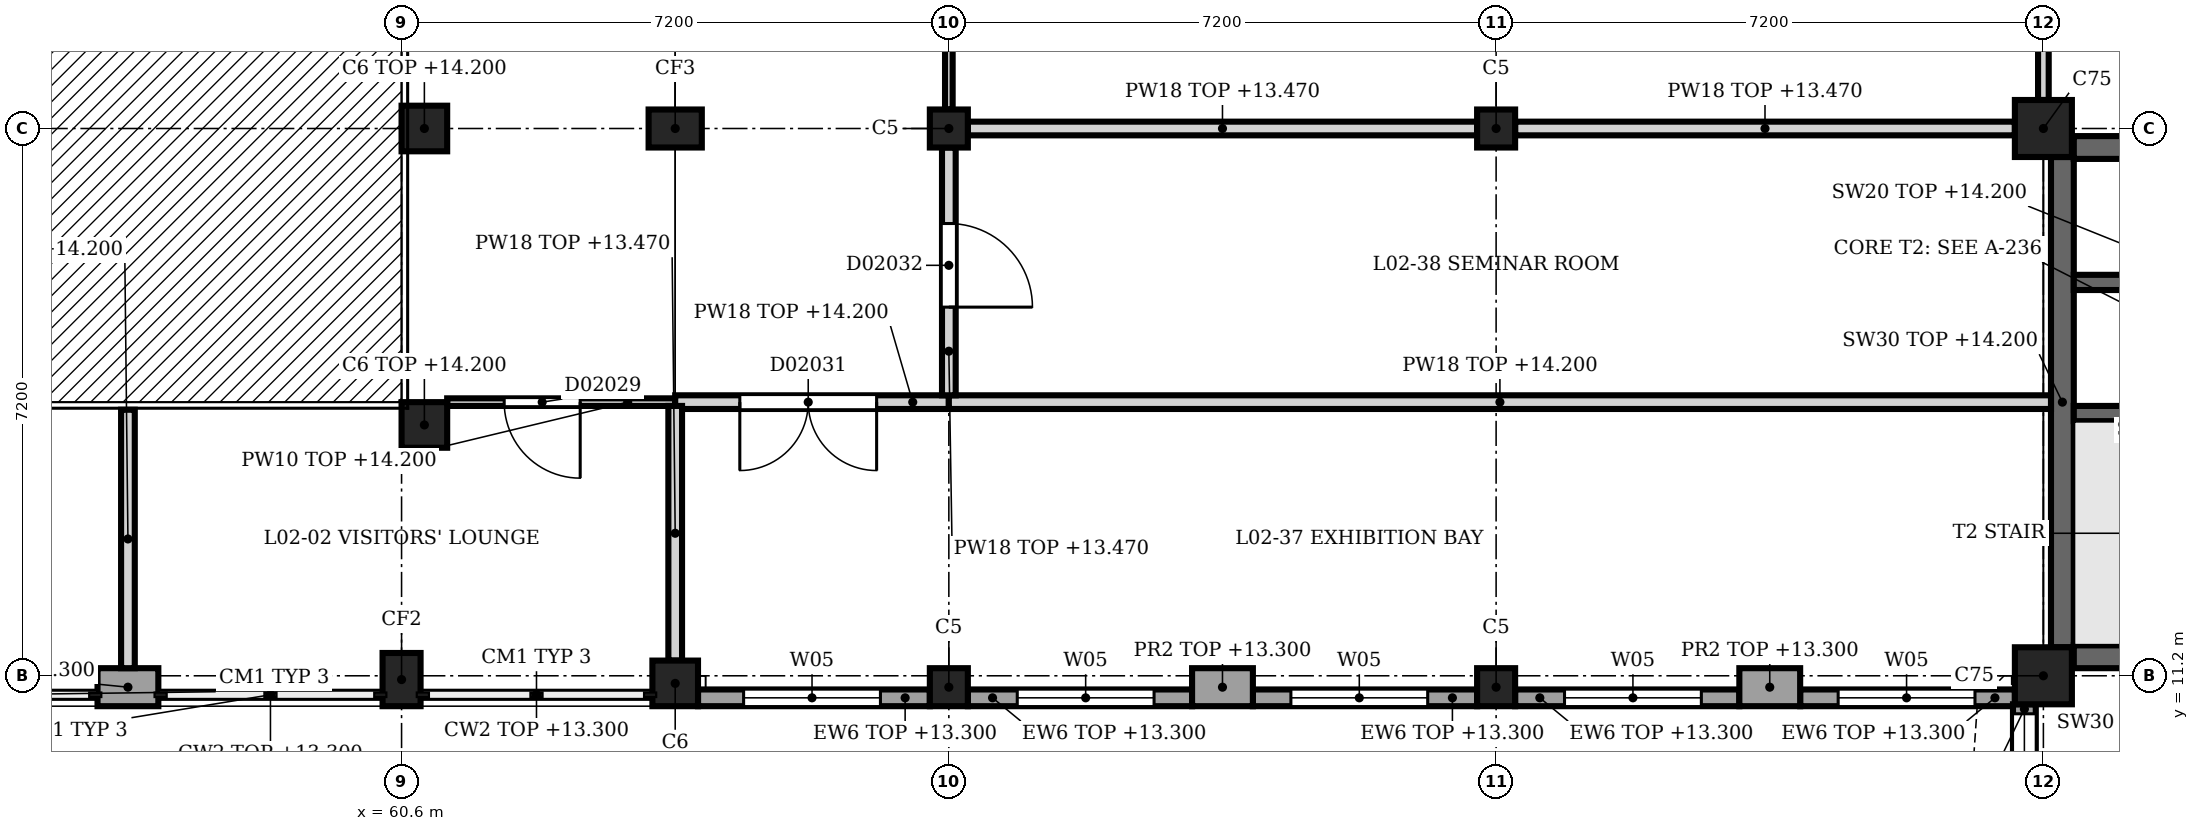
"""IFC4 building model, lengths in metres.
Left out: names, types, materials, properties, quantities, classifications, styles, units other than length and angle.
Written with IfcOpenShell. Run it as: python <this file> out.ifc"""

import sys

from ifc_helpers import new_model, si_unit, direction, frame, frame_2d, origin, origin_2d, place, context, subcontext, project, spatial, rectangle, extrude, element, fill, save


model = new_model("IFC4")
c1 = context("Model", 3, precision=1e-05, world=origin(), true_north=direction((0.0, 1.0)))
c2 = subcontext(c1, "Body", "Model", "MODEL_VIEW")
j1 = project(units=[si_unit("LENGTHUNIT", "METRE"), si_unit("PLANEANGLEUNIT", "RADIAN")], contexts=[c1])
p1 = place(None, origin())
s1 = spatial("IfcSite", under=j1, at=p1, CompositionType="ELEMENT")
p2 = place(p1, origin())
s2 = spatial("IfcBuilding", under=s1, at=p2, CompositionType="ELEMENT")
p3 = place(p2, frame((0.0, 0.0, 9.9)))
s3 = spatial("IfcBuildingStorey", under=s2, at=p3, CompositionType="ELEMENT", Elevation=9.9)
for number, where, z_axis, x_axis in (
    (1, (82.2, 11.2, 0.0), (0.0, 0.0, 1.0), (1.0, 0.0, 0.0)),
    (2, (82.2, 18.4, 0.0), (0.0, 0.0, 1.0), (1.0, 0.0, 0.0)),
):
    element("IfcColumn", number, at=place(p3, frame(where, z_axis=z_axis, x_axis=x_axis)), inside=s3, PredefinedType="COLUMN", context=c2, shape_type="SweptSolid", body=[
        extrude(rectangle(XDim=0.75, YDim=0.75, at=origin_2d()), origin(), (0.0, 0.0, 1.0), 4.5),
    ])
p4 = place(p3, frame((60.6, 11.15, 0.0), z_axis=(0.0, 0.0, 1.0), x_axis=(1.0, 0.0, 0.0)))
e3 = element("IfcColumn", 3, at=p4, inside=s3, PredefinedType="COLUMN", context=c2, shape_type="SweptSolid", body=[
    extrude(rectangle(XDim=0.5, YDim=0.7, at=origin_2d()), origin(), (0.0, 0.0, 1.0), 4.5),
])
p5 = place(p3, frame((64.2, 11.1, 0.0), z_axis=(0.0, 0.0, 1.0), x_axis=(1.0, 0.0, 0.0)))
e4 = element("IfcColumn", 4, at=p5, inside=s3, PredefinedType="COLUMN", context=c2, shape_type="SweptSolid", body=[
    extrude(rectangle(XDim=0.6, YDim=0.6, at=origin_2d()), origin(), (0.0, 0.0, 1.0), 4.5),
])
p6 = place(p3, frame((64.2, 18.4, 0.0), z_axis=(0.0, 0.0, 1.0), x_axis=(1.0, 0.0, 0.0)))
e5 = element("IfcColumn", 5, at=p6, inside=s3, PredefinedType="COLUMN", context=c2, shape_type="SweptSolid", body=[
    extrude(rectangle(XDim=0.7, YDim=0.5, at=origin_2d()), origin(), (0.0, 0.0, 1.0), 4.5),
])
for number, where, z_axis, x_axis in (
    (6, (60.9, 14.5, 0.0), (0.0, 0.0, 1.0), (1.0, 0.0, 0.0)),
    (7, (60.9, 18.4, 0.0), (0.0, 0.0, 1.0), (1.0, 0.0, 0.0)),
):
    element("IfcColumn", number, at=place(p3, frame(where, z_axis=z_axis, x_axis=x_axis)), inside=s3, PredefinedType="COLUMN", context=c2, shape_type="SweptSolid", body=[
        extrude(rectangle(XDim=0.6, YDim=0.6, at=origin_2d()), origin(), (0.0, 0.0, 1.0), 4.3),
    ])
for number, where, z_axis, x_axis in (
    (8, (67.8, 11.05, 0.0), (0.0, 0.0, 1.0), (1.0, 0.0, 0.0)),
    (9, (67.8, 18.4, 0.0), (0.0, 0.0, 1.0), (1.0, 0.0, 0.0)),
    (10, (75.0, 11.05, 0.0), (0.0, 0.0, 1.0), (1.0, 0.0, 0.0)),
    (11, (75.0, 18.4, 0.0), (0.0, 0.0, 1.0), (1.0, 0.0, 0.0)),
):
    element("IfcColumn", number, at=place(p3, frame(where, z_axis=z_axis, x_axis=x_axis)), inside=s3, PredefinedType="COLUMN", context=c2, shape_type="SweptSolid", body=[
        extrude(rectangle(XDim=0.5, YDim=0.5, at=origin_2d()), origin(), (0.0, 0.0, 1.0), 4.5),
    ])
p7 = place(p3, frame((81.95, 8.0, 0.0), z_axis=(0.0, 0.0, 1.0), x_axis=(0.0, 1.0, 0.0)))
e12 = element("IfcWall", 12, at=p7, inside=s3, PredefinedType="SOLIDWALL", context=c2, shape_type="SweptSolid", body=[
    extrude(rectangle(XDim=2.825, YDim=0.3, at=frame_2d((1.413, 0.0))), origin(), (0.0, 0.0, 1.0), 3.4),
])
p8 = place(p7, frame((0.1, 0.0, 0.9)))
e13 = element("IfcOpeningElement", 13, at=p8, cuts=e12, PredefinedType="OPENING", context=c2, shape_type="SweptSolid", body=[
    extrude(rectangle(XDim=2.6, YDim=2.4, at=frame_2d((1.3, 1.2))), frame((0.0, 0.16, 0.0), z_axis=(0.0, -1.0, 0.0), x_axis=(1.0, 0.0, 0.0)), (0.0, 0.0, 1.0), 0.32),
])
for number, where, z_axis, x_axis in (
    (14, (79.0, 11.05, 0.0), (0.0, 0.0, 1.0), (-1.0, 0.0, 0.0)),
    (15, (71.8, 11.05, 0.0), (0.0, 0.0, 1.0), (-1.0, 0.0, 0.0)),
):
    element("IfcWall", number, at=place(p3, frame(where, z_axis=z_axis, x_axis=x_axis)), inside=s3, PredefinedType="SOLIDWALL", context=c2, shape_type="SweptSolid", body=[
        extrude(rectangle(XDim=0.8, YDim=0.5, at=frame_2d((0.4, 0.0))), origin(), (0.0, 0.0, 1.0), 3.4),
    ])
p9 = place(p3, frame((81.825, 10.91, 0.0), z_axis=(0.0, 0.0, 1.0), x_axis=(-1.0, 0.0, 0.0)))
e16 = element("IfcWall", 16, at=p9, inside=s3, PredefinedType="SOLIDWALL", context=c2, shape_type="SweptSolid", body=[
    extrude(rectangle(XDim=2.825, YDim=0.22, at=frame_2d((1.413, 0.0))), origin(), (0.0, 0.0, 1.0), 3.4),
])
p10 = place(p9, frame((0.525, 0.0, 0.9)))
e17 = element("IfcOpeningElement", 17, at=p10, cuts=e16, PredefinedType="OPENING", context=c2, shape_type="SweptSolid", body=[
    extrude(rectangle(XDim=1.8, YDim=2.4, at=frame_2d((0.9, 1.2))), frame((0.0, 0.12, 0.0), z_axis=(0.0, -1.0, 0.0), x_axis=(1.0, 0.0, 0.0)), (0.0, 0.0, 1.0), 0.24),
])
p11 = place(p3, frame((78.2, 10.91, 0.0), z_axis=(0.0, 0.0, 1.0), x_axis=(-1.0, 0.0, 0.0)))
e18 = element("IfcWall", 18, at=p11, inside=s3, PredefinedType="SOLIDWALL", context=c2, shape_type="SweptSolid", body=[
    extrude(rectangle(XDim=2.95, YDim=0.22, at=frame_2d((1.475, 0.0))), origin(), (0.0, 0.0, 1.0), 3.4),
])
p12 = place(p11, frame((0.5, 0.0, 0.9)))
e19 = element("IfcOpeningElement", 19, at=p12, cuts=e18, PredefinedType="OPENING", context=c2, shape_type="SweptSolid", body=[
    extrude(rectangle(XDim=1.8, YDim=2.4, at=frame_2d((0.9, 1.2))), frame((0.0, 0.12, 0.0), z_axis=(0.0, -1.0, 0.0), x_axis=(1.0, 0.0, 0.0)), (0.0, 0.0, 1.0), 0.24),
])
p13 = place(p3, frame((74.75, 10.91, 0.0), z_axis=(0.0, 0.0, 1.0), x_axis=(-1.0, 0.0, 0.0)))
e20 = element("IfcWall", 20, at=p13, inside=s3, PredefinedType="SOLIDWALL", context=c2, shape_type="SweptSolid", body=[
    extrude(rectangle(XDim=2.95, YDim=0.22, at=frame_2d((1.475, 0.0))), origin(), (0.0, 0.0, 1.0), 3.4),
])
p14 = place(p13, frame((0.65, 0.0, 0.9)))
e21 = element("IfcOpeningElement", 21, at=p14, cuts=e20, PredefinedType="OPENING", context=c2, shape_type="SweptSolid", body=[
    extrude(rectangle(XDim=1.8, YDim=2.4, at=frame_2d((0.9, 1.2))), frame((0.0, 0.12, 0.0), z_axis=(0.0, -1.0, 0.0), x_axis=(1.0, 0.0, 0.0)), (0.0, 0.0, 1.0), 0.24),
])
p15 = place(p3, frame((71.0, 10.91, 0.0), z_axis=(0.0, 0.0, 1.0), x_axis=(-1.0, 0.0, 0.0)))
e22 = element("IfcWall", 22, at=p15, inside=s3, PredefinedType="SOLIDWALL", context=c2, shape_type="SweptSolid", body=[
    extrude(rectangle(XDim=2.95, YDim=0.22, at=frame_2d((1.475, 0.0))), origin(), (0.0, 0.0, 1.0), 3.4),
])
p16 = place(p15, frame((0.5, 0.0, 0.9)))
e23 = element("IfcOpeningElement", 23, at=p16, cuts=e22, PredefinedType="OPENING", context=c2, shape_type="SweptSolid", body=[
    extrude(rectangle(XDim=1.8, YDim=2.4, at=frame_2d((0.9, 1.2))), frame((0.0, 0.12, 0.0), z_axis=(0.0, -1.0, 0.0), x_axis=(1.0, 0.0, 0.0)), (0.0, 0.0, 1.0), 0.24),
])
p17 = place(p3, frame((67.55, 10.91, 0.0), z_axis=(0.0, 0.0, 1.0), x_axis=(-1.0, 0.0, 0.0)))
e24 = element("IfcWall", 24, at=p17, inside=s3, PredefinedType="SOLIDWALL", context=c2, shape_type="SweptSolid", body=[
    extrude(rectangle(XDim=3.05, YDim=0.22, at=frame_2d((1.525, 0.0))), origin(), (0.0, 0.0, 1.0), 3.4),
])
p18 = place(p17, frame((0.65, 0.0, 0.9)))
e25 = element("IfcOpeningElement", 25, at=p18, cuts=e24, PredefinedType="OPENING", context=c2, shape_type="SweptSolid", body=[
    extrude(rectangle(XDim=1.8, YDim=2.4, at=frame_2d((0.9, 1.2))), frame((0.0, 0.12, 0.0), z_axis=(0.0, -1.0, 0.0), x_axis=(1.0, 0.0, 0.0)), (0.0, 0.0, 1.0), 0.24),
])
p19 = place(p3, frame((57.4, 11.05, 0.0), z_axis=(0.0, 0.0, 1.0), x_axis=(-1.0, 0.0, 0.0)))
e26 = element("IfcWall", 26, at=p19, inside=s3, PredefinedType="SOLIDWALL", context=c2, shape_type="SweptSolid", body=[
    extrude(rectangle(XDim=0.8, YDim=0.5, at=frame_2d((0.4, 0.0))), origin(), (0.0, 0.0, 1.0), 3.4),
])
p20 = place(p3, frame((82.45, 11.575, 0.0), z_axis=(0.0, 0.0, 1.0), x_axis=(0.0, 1.0, 0.0)))
e27 = element("IfcWall", 27, at=p20, inside=s3, PredefinedType="SHEAR", context=c2, shape_type="SweptSolid", body=[
    extrude(rectangle(XDim=6.45, YDim=0.3, at=frame_2d((3.225, 0.0))), origin(), (0.0, 0.0, 1.0), 4.3),
])
for number, where, z_axis, x_axis in (
    (28, (82.6, 11.45, 0.0), (0.0, 0.0, 1.0), (1.0, 0.0, 0.0)),
    (29, (82.6, 18.15, 0.0), (0.0, 0.0, 1.0), (1.0, 0.0, 0.0)),
):
    element("IfcWall", number, at=place(p3, frame(where, z_axis=z_axis, x_axis=x_axis)), inside=s3, PredefinedType="SHEAR", context=c2, shape_type="SweptSolid", body=[
        extrude(rectangle(XDim=6.4, YDim=0.3, at=frame_2d((3.2, 0.0))), origin(), (0.0, 0.0, 1.0), 4.3),
    ])
p21 = place(p3, frame((89.0, 14.65, 0.0), z_axis=(0.0, 0.0, 1.0), x_axis=(-1.0, 0.0, 0.0)))
e30 = element("IfcWall", 30, at=p21, inside=s3, PredefinedType="SHEAR", context=c2, shape_type="SweptSolid", body=[
    extrude(rectangle(XDim=6.4, YDim=0.2, at=frame_2d((3.2, 0.0))), origin(), (0.0, 0.0, 1.0), 4.3),
])
p22 = place(p21, frame((0.1, 0.0, 0.0)))
e31 = element("IfcOpeningElement", 31, at=p22, cuts=e30, PredefinedType="OPENING", context=c2, shape_type="SweptSolid", body=[
    extrude(rectangle(XDim=1.0, YDim=2.1, at=frame_2d((0.5, 1.05))), frame((0.0, 0.11, 0.0), z_axis=(0.0, -1.0, 0.0), x_axis=(1.0, 0.0, 0.0)), (0.0, 0.0, 1.0), 0.22),
])
p23 = place(p3, frame((82.6, 16.375, 0.0), z_axis=(0.0, 0.0, 1.0), x_axis=(1.0, 0.0, 0.0)))
e32 = element("IfcWall", 32, at=p23, inside=s3, PredefinedType="SHEAR", context=c2, shape_type="SweptSolid", body=[
    extrude(rectangle(XDim=3.8, YDim=0.2, at=frame_2d((1.9, 0.0))), origin(), (0.0, 0.0, 1.0), 4.3),
])
p24 = place(p3, frame((64.2, 14.8, 0.0), z_axis=(0.0, 0.0, 1.0), x_axis=(-1.0, 0.0, 0.0)))
e33 = element("IfcWall", 33, at=p24, inside=s3, PredefinedType="PARTITIONING", context=c2, shape_type="SweptSolid", body=[
    extrude(rectangle(XDim=3.0, YDim=0.1, at=frame_2d((1.5, 0.0))), origin(), (0.0, 0.0, 1.0), 4.3),
])
p25 = place(p24, frame((1.25, 0.0, 0.0)))
e34 = element("IfcOpeningElement", 34, at=p25, cuts=e33, PredefinedType="OPENING", context=c2, shape_type="SweptSolid", body=[
    extrude(rectangle(XDim=1.0, YDim=2.1, at=frame_2d((0.5, 1.05))), frame((0.0, 0.06, 0.0), z_axis=(0.0, -1.0, 0.0), x_axis=(1.0, 0.0, 0.0)), (0.0, 0.0, 1.0), 0.12),
])
p26 = place(p3, frame((64.2, 14.8, 0.0), z_axis=(0.0, 0.0, 1.0), x_axis=(1.0, 0.0, 0.0)))
e35 = element("IfcWall", 35, at=p26, inside=s3, PredefinedType="PARTITIONING", context=c2, shape_type="SweptSolid", body=[
    extrude(rectangle(XDim=3.6, YDim=0.18, at=frame_2d((1.8, 0.0))), origin(), (0.0, 0.0, 1.0), 4.3),
])
p27 = place(p26, frame((0.85, 0.0, 0.0)))
e36 = element("IfcOpeningElement", 36, at=p27, cuts=e35, PredefinedType="OPENING", context=c2, shape_type="SweptSolid", body=[
    extrude(rectangle(XDim=1.8, YDim=2.3, at=frame_2d((0.9, 1.15))), frame((0.0, 0.1, 0.0), z_axis=(0.0, -1.0, 0.0), x_axis=(1.0, 0.0, 0.0)), (0.0, 0.0, 1.0), 0.2),
])
p28 = place(p3, frame((67.8, 14.8, 0.0), z_axis=(0.0, 0.0, 1.0), x_axis=(1.0, 0.0, 0.0)))
e37 = element("IfcWall", 37, at=p28, inside=s3, PredefinedType="PARTITIONING", context=c2, shape_type="SweptSolid", body=[
    extrude(rectangle(XDim=14.5, YDim=0.18, at=frame_2d((7.25, 0.0))), origin(), (0.0, 0.0, 1.0), 4.3),
])
p29 = place(p3, frame((68.05, 18.4, 0.0), z_axis=(0.0, 0.0, 1.0), x_axis=(1.0, 0.0, 0.0)))
e38 = element("IfcWall", 38, at=p29, inside=s3, PredefinedType="PARTITIONING", context=c2, shape_type="SweptSolid", body=[
    extrude(rectangle(XDim=6.7, YDim=0.18, at=frame_2d((3.35, 0.0))), origin(), (0.0, 0.0, 1.0), 3.57),
])
p30 = place(p3, frame((75.25, 18.4, 0.0), z_axis=(0.0, 0.0, 1.0), x_axis=(1.0, 0.0, 0.0)))
e39 = element("IfcWall", 39, at=p30, inside=s3, PredefinedType="PARTITIONING", context=c2, shape_type="SweptSolid", body=[
    extrude(rectangle(XDim=6.575, YDim=0.18, at=frame_2d((3.288, 0.0))), origin(), (0.0, 0.0, 1.0), 3.57),
])
p31 = place(p3, frame((57.0, 11.3, 0.0), z_axis=(0.0, 0.0, 1.0), x_axis=(0.0, 1.0, 0.0)))
e40 = element("IfcWall", 40, at=p31, inside=s3, PredefinedType="PARTITIONING", context=c2, shape_type="SweptSolid", body=[
    extrude(rectangle(XDim=3.4, YDim=0.18, at=frame_2d((1.7, 0.0))), origin(), (0.0, 0.0, 1.0), 4.3),
])
p32 = place(p3, frame((64.2, 11.4, 0.0), z_axis=(0.0, 0.0, 1.0), x_axis=(0.0, 1.0, 0.0)))
e41 = element("IfcWall", 41, at=p32, inside=s3, PredefinedType="PARTITIONING", context=c2, shape_type="SweptSolid", body=[
    extrude(rectangle(XDim=3.35, YDim=0.18, at=frame_2d((1.675, 0.0))), origin(), (0.0, 0.0, 1.0), 3.57),
])
p33 = place(p3, frame((67.8, 18.15, 0.0), z_axis=(0.0, 0.0, 1.0), x_axis=(0.0, -1.0, 0.0)))
e42 = element("IfcWall", 42, at=p33, inside=s3, PredefinedType="PARTITIONING", context=c2, shape_type="SweptSolid", body=[
    extrude(rectangle(XDim=3.26, YDim=0.18, at=frame_2d((1.63, 0.0))), origin(), (0.0, 0.0, 1.0), 3.57),
])
p34 = place(p33, frame((1.0, 0.0, 0.0)))
e43 = element("IfcOpeningElement", 43, at=p34, cuts=e42, PredefinedType="OPENING", context=c2, shape_type="SweptSolid", body=[
    extrude(rectangle(XDim=1.1, YDim=2.3, at=frame_2d((0.55, 1.15))), frame((0.0, 0.1, 0.0), z_axis=(0.0, -1.0, 0.0), x_axis=(1.0, 0.0, 0.0)), (0.0, 0.0, 1.0), 0.2),
])
p35 = place(p3, frame((67.8, 25.35, 0.0), z_axis=(0.0, 0.0, 1.0), x_axis=(0.0, -1.0, 0.0)))
e44 = element("IfcWall", 44, at=p35, inside=s3, PredefinedType="PARTITIONING", context=c2, shape_type="SweptSolid", body=[
    extrude(rectangle(XDim=6.7, YDim=0.1, at=frame_2d((3.35, 0.0))), origin(), (0.0, 0.0, 1.0), 3.57),
])
p36 = place(p35, frame((2.9, 0.0, 0.0)))
e45 = element("IfcOpeningElement", 45, at=p36, cuts=e44, PredefinedType="OPENING", context=c2, shape_type="SweptSolid", body=[
    extrude(rectangle(XDim=1.0, YDim=2.1, at=frame_2d((0.5, 1.05))), frame((0.0, 0.06, 0.0), z_axis=(0.0, -1.0, 0.0), x_axis=(1.0, 0.0, 0.0)), (0.0, 0.0, 1.0), 0.12),
])
p37 = place(p3, frame((82.2, 18.775, 0.0), z_axis=(0.0, 0.0, 1.0), x_axis=(0.0, 1.0, 0.0)))
e46 = element("IfcWall", 46, at=p37, inside=s3, PredefinedType="PARTITIONING", context=c2, shape_type="SweptSolid", body=[
    extrude(rectangle(XDim=6.45, YDim=0.14, at=frame_2d((3.225, 0.0))), origin(), (0.0, 0.0, 1.0), 3.47),
])
p38 = place(p8, origin())
e47 = element("IfcWindow", 47, at=p38, inside=s3, PartitioningType="SINGLE_PANEL", PredefinedType="WINDOW", context=c2, shape_type="SweptSolid", body=[
    extrude(rectangle(XDim=2.6, YDim=2.4, at=frame_2d((1.3, 1.2))), frame((0.0, 0.03, 0.0), z_axis=(0.0, -1.0, 0.0), x_axis=(1.0, 0.0, 0.0)), (0.0, 0.0, 1.0), 0.06),
])
fill(e13, e47)
p39 = place(p10, origin())
e48 = element("IfcWindow", 48, at=p39, inside=s3, PartitioningType="SINGLE_PANEL", PredefinedType="WINDOW", context=c2, shape_type="SweptSolid", body=[
    extrude(rectangle(XDim=1.8, YDim=2.4, at=frame_2d((0.9, 1.2))), frame((0.0, 0.03, 0.0), z_axis=(0.0, -1.0, 0.0), x_axis=(1.0, 0.0, 0.0)), (0.0, 0.0, 1.0), 0.06),
])
fill(e17, e48)
p40 = place(p12, origin())
e49 = element("IfcWindow", 49, at=p40, inside=s3, PartitioningType="SINGLE_PANEL", PredefinedType="WINDOW", context=c2, shape_type="SweptSolid", body=[
    extrude(rectangle(XDim=1.8, YDim=2.4, at=frame_2d((0.9, 1.2))), frame((0.0, 0.03, 0.0), z_axis=(0.0, -1.0, 0.0), x_axis=(1.0, 0.0, 0.0)), (0.0, 0.0, 1.0), 0.06),
])
fill(e19, e49)
p41 = place(p14, origin())
e50 = element("IfcWindow", 50, at=p41, inside=s3, PartitioningType="SINGLE_PANEL", PredefinedType="WINDOW", context=c2, shape_type="SweptSolid", body=[
    extrude(rectangle(XDim=1.8, YDim=2.4, at=frame_2d((0.9, 1.2))), frame((0.0, 0.03, 0.0), z_axis=(0.0, -1.0, 0.0), x_axis=(1.0, 0.0, 0.0)), (0.0, 0.0, 1.0), 0.06),
])
fill(e21, e50)
p42 = place(p16, origin())
e51 = element("IfcWindow", 51, at=p42, inside=s3, PartitioningType="SINGLE_PANEL", PredefinedType="WINDOW", context=c2, shape_type="SweptSolid", body=[
    extrude(rectangle(XDim=1.8, YDim=2.4, at=frame_2d((0.9, 1.2))), frame((0.0, 0.03, 0.0), z_axis=(0.0, -1.0, 0.0), x_axis=(1.0, 0.0, 0.0)), (0.0, 0.0, 1.0), 0.06),
])
fill(e23, e51)
p43 = place(p18, origin())
e52 = element("IfcWindow", 52, at=p43, inside=s3, PartitioningType="SINGLE_PANEL", PredefinedType="WINDOW", context=c2, shape_type="SweptSolid", body=[
    extrude(rectangle(XDim=1.8, YDim=2.4, at=frame_2d((0.9, 1.2))), frame((0.0, 0.03, 0.0), z_axis=(0.0, -1.0, 0.0), x_axis=(1.0, 0.0, 0.0)), (0.0, 0.0, 1.0), 0.06),
])
fill(e25, e52)
p44 = place(p25, origin())
e53 = element("IfcDoor", 53, at=p44, inside=s3, OperationType="SINGLE_SWING_RIGHT", PredefinedType="DOOR", context=c2, shape_type="SweptSolid", body=[
    extrude(rectangle(XDim=1.0, YDim=2.1, at=frame_2d((0.5, 1.05))), frame((0.0, 0.025, 0.0), z_axis=(0.0, -1.0, 0.0), x_axis=(1.0, 0.0, 0.0)), (0.0, 0.0, 1.0), 0.05),
])
fill(e34, e53)
p45 = place(p27, origin())
e54 = element("IfcDoor", 54, at=p45, inside=s3, OperationType="SINGLE_SWING_LEFT", PredefinedType="DOOR", context=c2, shape_type="SweptSolid", body=[
    extrude(rectangle(XDim=1.8, YDim=2.3, at=frame_2d((0.9, 1.15))), frame((0.0, 0.025, 0.0), z_axis=(0.0, -1.0, 0.0), x_axis=(1.0, 0.0, 0.0)), (0.0, 0.0, 1.0), 0.05),
])
fill(e36, e54)
p46 = place(p34, origin())
e55 = element("IfcDoor", 55, at=p46, inside=s3, OperationType="SINGLE_SWING_LEFT", PredefinedType="DOOR", context=c2, shape_type="SweptSolid", body=[
    extrude(rectangle(XDim=1.1, YDim=2.3, at=frame_2d((0.55, 1.15))), frame((0.0, 0.025, 0.0), z_axis=(0.0, -1.0, 0.0), x_axis=(1.0, 0.0, 0.0)), (0.0, 0.0, 1.0), 0.05),
])
fill(e43, e55)
save(model, sys.argv[1])
